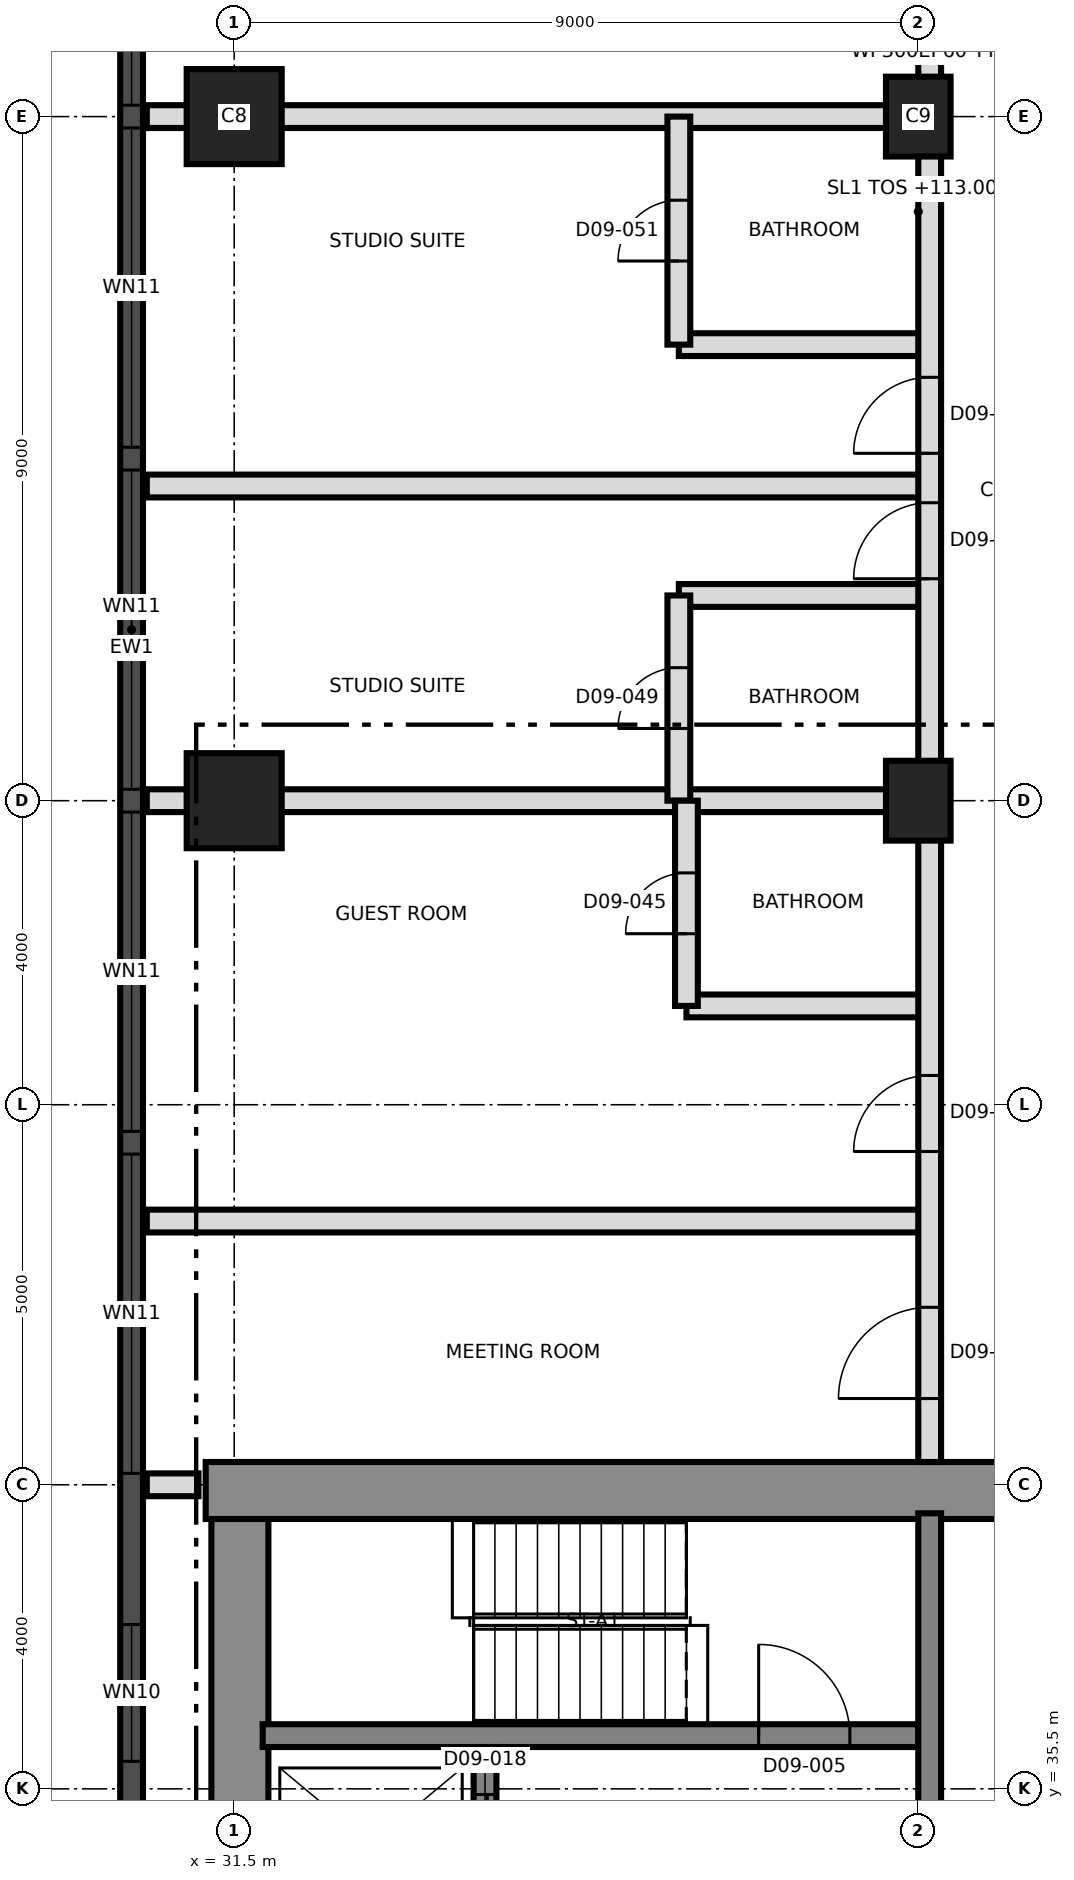
"""IFC4 building model, lengths in metres.
Left out: names, types, materials, properties, quantities, classifications, styles, units other than length and angle.
Written with IfcOpenShell. Run it as: python <this file> out.ifc"""

import sys

from ifc_helpers import new_model, si_unit, direction, frame, frame_2d, origin, origin_2d, place, context, subcontext, project, spatial, rectangle, extrude, element, fill, save


model = new_model("IFC4")
c1 = context("Model", 3, precision=1e-05, world=origin(), true_north=direction((0.0, 1.0)))
c2 = subcontext(c1, "Body", "Model", "MODEL_VIEW")
j1 = project(units=[si_unit("LENGTHUNIT", "METRE"), si_unit("PLANEANGLEUNIT", "RADIAN")], contexts=[c1])
p1 = place(None, origin())
s1 = spatial("IfcSite", under=j1, at=p1, CompositionType="ELEMENT")
p2 = place(p1, origin())
s2 = spatial("IfcBuilding", under=s1, at=p2, CompositionType="ELEMENT")
p3 = place(p2, frame((0.0, 0.0, 113.0)))
s3 = spatial("IfcBuildingStorey", under=s2, at=p3, CompositionType="ELEMENT", Elevation=113.0)
p4 = place(p3, frame((31.575, 21.875, 0.0), z_axis=(0.0, 0.0, 1.0), x_axis=(0.0, 1.0, 0.0)))
e1 = element("IfcWall", 1, at=p4, inside=s3, PredefinedType="SHEAR", context=c2, shape_type="SweptSolid", body=[
    extrude(rectangle(XDim=17.25, YDim=0.75, at=frame_2d((8.625, 0.0))), origin(), (0.0, 0.0, 1.0), 3.7),
])
p5 = place(p3, frame((31.125, 39.425, 0.0), z_axis=(0.0, 0.0, 1.0), x_axis=(1.0, 0.0, 0.0)))
e2 = element("IfcWall", 2, at=p5, inside=s3, PredefinedType="SHEAR", context=c2, shape_type="SweptSolid", body=[
    extrude(rectangle(XDim=27.0, YDim=0.75, at=frame_2d((13.5, 0.0))), origin(), (0.0, 0.0, 1.0), 3.7),
])
p6 = place(p5, frame((10.575, 0.0, 0.0)))
e3 = element("IfcOpeningElement", 3, at=p6, cuts=e2, PredefinedType="OPENING", context=c2, shape_type="SweptSolid", body=[
    extrude(rectangle(XDim=1.2, YDim=2.1, at=frame_2d((0.6, 1.05))), frame((0.0, 0.385, 0.0), z_axis=(0.0, -1.0, 0.0), x_axis=(1.0, 0.0, 0.0)), (0.0, 0.0, 1.0), 0.77),
])
p7 = place(p3, frame((31.875, 36.2, 0.0), z_axis=(0.0, 0.0, 1.0), x_axis=(1.0, 0.0, 0.0)))
e4 = element("IfcWall", 4, at=p7, inside=s3, PredefinedType="SHEAR", context=c2, shape_type="SweptSolid", body=[
    extrude(rectangle(XDim=8.625, YDim=0.3, at=frame_2d((4.312, 0.0))), origin(), (0.0, 0.0, 1.0), 3.7),
])
p8 = place(p7, frame((6.525, 0.0, 0.0)))
e5 = element("IfcOpeningElement", 5, at=p8, cuts=e4, PredefinedType="OPENING", context=c2, shape_type="SweptSolid", body=[
    extrude(rectangle(XDim=1.2, YDim=2.1, at=frame_2d((0.6, 1.05))), frame((0.0, 0.16, 0.0), z_axis=(0.0, -1.0, 0.0), x_axis=(1.0, 0.0, 0.0)), (0.0, 0.0, 1.0), 0.32),
])
p9 = place(p3, frame((40.65, 33.5, 0.0), z_axis=(0.0, 0.0, 1.0), x_axis=(0.0, 1.0, 0.0)))
e6 = element("IfcWall", 6, at=p9, inside=s3, PredefinedType="SHEAR", context=c2, shape_type="SweptSolid", body=[
    extrude(rectangle(XDim=5.625, YDim=0.3, at=frame_2d((2.812, 0.0))), origin(), (0.0, 0.0, 1.0), 3.7),
])
p10 = place(p3, frame((34.8, 33.5, 0.0), z_axis=(0.0, 0.0, 1.0), x_axis=(0.0, 1.0, 0.0)))
e7 = element("IfcWall", 7, at=p10, inside=s3, PredefinedType="SHEAR", context=c2, shape_type="SweptSolid", body=[
    extrude(rectangle(XDim=2.55, YDim=0.3, at=frame_2d((1.275, 0.0))), origin(), (0.0, 0.0, 1.0), 3.7),
])
p11 = place(p10, frame((0.625, 0.0, 0.0)))
e8 = element("IfcOpeningElement", 8, at=p11, cuts=e7, PredefinedType="OPENING", context=c2, shape_type="SweptSolid", body=[
    extrude(rectangle(XDim=1.3, YDim=2.4, at=frame_2d((0.65, 1.2))), frame((0.0, 0.16, 0.0), z_axis=(0.0, -1.0, 0.0), x_axis=(1.0, 0.0, 0.0)), (0.0, 0.0, 1.0), 0.32),
])
p12 = place(p3, frame((31.5, 48.5, 0.0), z_axis=(0.0, 0.0, 1.0), x_axis=(1.0, 0.0, 0.0)))
e9 = element("IfcColumn", 9, at=p12, inside=s3, PredefinedType="COLUMN", context=c2, shape_type="SweptSolid", body=[
    extrude(rectangle(XDim=1.25, YDim=1.25, at=origin_2d()), origin(), (0.0, 0.0, 1.0), 3.7),
])
p13 = place(p3, frame((40.5, 48.5, 0.0), z_axis=(0.0, 0.0, 1.0), x_axis=(0.0, 1.0, 0.0)))
e10 = element("IfcColumn", 10, at=p13, inside=s3, PredefinedType="COLUMN", context=c2, shape_type="SweptSolid", body=[
    extrude(rectangle(XDim=1.05, YDim=0.85, at=origin_2d()), origin(), (0.0, 0.0, 1.0), 3.7),
])
p14 = place(p3, frame((31.5, 57.5, 0.0), z_axis=(0.0, 0.0, 1.0), x_axis=(1.0, 0.0, 0.0)))
e11 = element("IfcColumn", 11, at=p14, inside=s3, PredefinedType="COLUMN", context=c2, shape_type="SweptSolid", body=[
    extrude(rectangle(XDim=1.25, YDim=1.25, at=origin_2d()), origin(), (0.0, 0.0, 1.0), 3.7),
])
p15 = place(p3, frame((40.5, 57.5, 0.0), z_axis=(0.0, 0.0, 1.0), x_axis=(0.0, 1.0, 0.0)))
e12 = element("IfcColumn", 12, at=p15, inside=s3, PredefinedType="COLUMN", context=c2, shape_type="SweptSolid", body=[
    extrude(rectangle(XDim=1.05, YDim=0.85, at=origin_2d()), origin(), (0.0, 0.0, 1.0), 3.7),
])
p16 = place(p3, frame((30.15, 66.992, 0.0), z_axis=(0.0, 0.0, 1.0), x_axis=(0.0, -1.0, 0.0)))
e13 = element("IfcWall", 13, at=p16, inside=s3, PredefinedType="SOLIDWALL", context=c2, shape_type="SweptSolid", body=[
    extrude(rectangle(XDim=32.968, YDim=0.3, at=frame_2d((16.484, 0.0))), origin(), (0.0, 0.0, 1.0), 3.4),
])
p17 = place(p16, frame((1.596, 0.0, 0.3)))
e14 = element("IfcOpeningElement", 14, at=p17, cuts=e13, PredefinedType="OPENING", context=c2, shape_type="SweptSolid", body=[
    extrude(rectangle(XDim=1.8, YDim=2.4, at=frame_2d((0.9, 1.2))), frame((0.0, 0.16, 0.0), z_axis=(0.0, -1.0, 0.0), x_axis=(1.0, 0.0, 0.0)), (0.0, 0.0, 1.0), 0.32),
])
p18 = place(p16, frame((5.142, 0.0, 0.9)))
e15 = element("IfcOpeningElement", 15, at=p18, cuts=e13, PredefinedType="OPENING", context=c2, shape_type="SweptSolid", body=[
    extrude(rectangle(XDim=4.2, YDim=1.5, at=frame_2d((2.1, 0.75))), frame((0.0, 0.16, 0.0), z_axis=(0.0, -1.0, 0.0), x_axis=(1.0, 0.0, 0.0)), (0.0, 0.0, 1.0), 0.32),
])
p19 = place(p16, frame((9.642, 0.0, 0.9)))
e16 = element("IfcOpeningElement", 16, at=p19, cuts=e13, PredefinedType="OPENING", context=c2, shape_type="SweptSolid", body=[
    extrude(rectangle(XDim=4.2, YDim=1.5, at=frame_2d((2.1, 0.75))), frame((0.0, 0.16, 0.0), z_axis=(0.0, -1.0, 0.0), x_axis=(1.0, 0.0, 0.0)), (0.0, 0.0, 1.0), 0.32),
])
p20 = place(p16, frame((14.142, 0.0, 0.9)))
e17 = element("IfcOpeningElement", 17, at=p20, cuts=e13, PredefinedType="OPENING", context=c2, shape_type="SweptSolid", body=[
    extrude(rectangle(XDim=4.2, YDim=1.5, at=frame_2d((2.1, 0.75))), frame((0.0, 0.16, 0.0), z_axis=(0.0, -1.0, 0.0), x_axis=(1.0, 0.0, 0.0)), (0.0, 0.0, 1.0), 0.32),
])
p21 = place(p16, frame((18.642, 0.0, 0.9)))
e18 = element("IfcOpeningElement", 18, at=p21, cuts=e13, PredefinedType="OPENING", context=c2, shape_type="SweptSolid", body=[
    extrude(rectangle(XDim=4.2, YDim=1.5, at=frame_2d((2.1, 0.75))), frame((0.0, 0.16, 0.0), z_axis=(0.0, -1.0, 0.0), x_axis=(1.0, 0.0, 0.0)), (0.0, 0.0, 1.0), 0.32),
])
p22 = place(p16, frame((23.142, 0.0, 0.9)))
e19 = element("IfcOpeningElement", 19, at=p22, cuts=e13, PredefinedType="OPENING", context=c2, shape_type="SweptSolid", body=[
    extrude(rectangle(XDim=4.2, YDim=1.5, at=frame_2d((2.1, 0.75))), frame((0.0, 0.16, 0.0), z_axis=(0.0, -1.0, 0.0), x_axis=(1.0, 0.0, 0.0)), (0.0, 0.0, 1.0), 0.32),
])
p23 = place(p16, frame((29.33, 0.0, 0.3)))
e20 = element("IfcOpeningElement", 20, at=p23, cuts=e13, PredefinedType="OPENING", context=c2, shape_type="SweptSolid", body=[
    extrude(rectangle(XDim=1.8, YDim=2.4, at=frame_2d((0.9, 1.2))), frame((0.0, 0.16, 0.0), z_axis=(0.0, -1.0, 0.0), x_axis=(1.0, 0.0, 0.0)), (0.0, 0.0, 1.0), 0.32),
])
p24 = place(p3, frame((30.35, 39.5, 0.0), z_axis=(0.0, 0.0, 1.0), x_axis=(1.0, 0.0, 0.0)))
e21 = element("IfcWall", 21, at=p24, inside=s3, PredefinedType="PARTITIONING", context=c2, shape_type="SweptSolid", body=[
    extrude(rectangle(XDim=0.68, YDim=0.3, at=frame_2d((0.34, 0.0))), origin(), (0.0, 0.0, 1.0), 3.4),
])
p25 = place(p3, frame((30.35, 42.97, 0.0), z_axis=(0.0, 0.0, 1.0), x_axis=(1.0, 0.0, 0.0)))
e22 = element("IfcWall", 22, at=p25, inside=s3, PredefinedType="PARTITIONING", context=c2, shape_type="SweptSolid", body=[
    extrude(rectangle(XDim=10.3, YDim=0.3, at=frame_2d((5.15, 0.0))), origin(), (0.0, 0.0, 1.0), 3.4),
])
p26 = place(p3, frame((37.45, 45.8, 0.0), z_axis=(0.0, 0.0, 1.0), x_axis=(1.0, 0.0, 0.0)))
e23 = element("IfcWall", 23, at=p26, inside=s3, PredefinedType="PARTITIONING", context=c2, shape_type="SweptSolid", body=[
    extrude(rectangle(XDim=3.2, YDim=0.3, at=frame_2d((1.6, 0.0))), origin(), (0.0, 0.0, 1.0), 3.4),
])
p27 = place(p3, frame((30.35, 48.5, 0.0), z_axis=(0.0, 0.0, 1.0), x_axis=(1.0, 0.0, 0.0)))
e24 = element("IfcWall", 24, at=p27, inside=s3, PredefinedType="PARTITIONING", context=c2, shape_type="SweptSolid", body=[
    extrude(rectangle(XDim=10.3, YDim=0.3, at=frame_2d((5.15, 0.0))), origin(), (0.0, 0.0, 1.0), 3.4),
])
p28 = place(p3, frame((37.35, 51.2, 0.0), z_axis=(0.0, 0.0, 1.0), x_axis=(1.0, 0.0, 0.0)))
e25 = element("IfcWall", 25, at=p28, inside=s3, PredefinedType="PARTITIONING", context=c2, shape_type="SweptSolid", body=[
    extrude(rectangle(XDim=3.3, YDim=0.3, at=frame_2d((1.65, 0.0))), origin(), (0.0, 0.0, 1.0), 3.4),
])
p29 = place(p3, frame((30.35, 52.64, 0.0), z_axis=(0.0, 0.0, 1.0), x_axis=(1.0, 0.0, 0.0)))
e26 = element("IfcWall", 26, at=p29, inside=s3, PredefinedType="PARTITIONING", context=c2, shape_type="SweptSolid", body=[
    extrude(rectangle(XDim=10.3, YDim=0.3, at=frame_2d((5.15, 0.0))), origin(), (0.0, 0.0, 1.0), 3.4),
])
p30 = place(p3, frame((37.35, 54.5, 0.0), z_axis=(0.0, 0.0, 1.0), x_axis=(1.0, 0.0, 0.0)))
e27 = element("IfcWall", 27, at=p30, inside=s3, PredefinedType="PARTITIONING", context=c2, shape_type="SweptSolid", body=[
    extrude(rectangle(XDim=3.3, YDim=0.3, at=frame_2d((1.65, 0.0))), origin(), (0.0, 0.0, 1.0), 3.4),
])
p31 = place(p3, frame((30.35, 57.5, 0.0), z_axis=(0.0, 0.0, 1.0), x_axis=(1.0, 0.0, 0.0)))
e28 = element("IfcWall", 28, at=p31, inside=s3, PredefinedType="PARTITIONING", context=c2, shape_type="SweptSolid", body=[
    extrude(rectangle(XDim=10.3, YDim=0.3, at=frame_2d((5.15, 0.0))), origin(), (0.0, 0.0, 1.0), 3.4),
])
p32 = place(p3, frame((37.35, 48.5, 0.0), z_axis=(0.0, 0.0, 1.0), x_axis=(0.0, 1.0, 0.0)))
e29 = element("IfcWall", 29, at=p32, inside=s3, PredefinedType="PARTITIONING", context=c2, shape_type="SweptSolid", body=[
    extrude(rectangle(XDim=2.7, YDim=0.3, at=frame_2d((1.35, 0.0))), origin(), (0.0, 0.0, 1.0), 3.4),
])
p33 = place(p32, frame((0.95, 0.0, 0.0)))
e30 = element("IfcOpeningElement", 30, at=p33, cuts=e29, PredefinedType="OPENING", context=c2, shape_type="SweptSolid", body=[
    extrude(rectangle(XDim=0.8, YDim=2.1, at=frame_2d((0.4, 1.05))), frame((0.0, 0.16, 0.0), z_axis=(0.0, -1.0, 0.0), x_axis=(1.0, 0.0, 0.0)), (0.0, 0.0, 1.0), 0.32),
])
p34 = place(p3, frame((37.35, 54.5, 0.0), z_axis=(0.0, 0.0, 1.0), x_axis=(0.0, 1.0, 0.0)))
e31 = element("IfcWall", 31, at=p34, inside=s3, PredefinedType="PARTITIONING", context=c2, shape_type="SweptSolid", body=[
    extrude(rectangle(XDim=3.0, YDim=0.3, at=frame_2d((1.5, 0.0))), origin(), (0.0, 0.0, 1.0), 3.4),
])
p35 = place(p34, frame((1.1, 0.0, 0.0)))
e32 = element("IfcOpeningElement", 32, at=p35, cuts=e31, PredefinedType="OPENING", context=c2, shape_type="SweptSolid", body=[
    extrude(rectangle(XDim=0.8, YDim=2.1, at=frame_2d((0.4, 1.05))), frame((0.0, 0.16, 0.0), z_axis=(0.0, -1.0, 0.0), x_axis=(1.0, 0.0, 0.0)), (0.0, 0.0, 1.0), 0.32),
])
p36 = place(p3, frame((37.45, 45.8, 0.0), z_axis=(0.0, 0.0, 1.0), x_axis=(0.0, 1.0, 0.0)))
e33 = element("IfcWall", 33, at=p36, inside=s3, PredefinedType="PARTITIONING", context=c2, shape_type="SweptSolid", body=[
    extrude(rectangle(XDim=2.7, YDim=0.3, at=frame_2d((1.35, 0.0))), origin(), (0.0, 0.0, 1.0), 3.4),
])
p37 = place(p36, frame((0.95, 0.0, 0.0)))
e34 = element("IfcOpeningElement", 34, at=p37, cuts=e33, PredefinedType="OPENING", context=c2, shape_type="SweptSolid", body=[
    extrude(rectangle(XDim=0.8, YDim=2.1, at=frame_2d((0.4, 1.05))), frame((0.0, 0.16, 0.0), z_axis=(0.0, -1.0, 0.0), x_axis=(1.0, 0.0, 0.0)), (0.0, 0.0, 1.0), 0.32),
])
p38 = place(p3, frame((40.65, 39.8, 0.0), z_axis=(0.0, 0.0, 1.0), x_axis=(0.0, 1.0, 0.0)))
e35 = element("IfcWall", 35, at=p38, inside=s3, PredefinedType="PARTITIONING", context=c2, shape_type="SweptSolid", body=[
    extrude(rectangle(XDim=37.09, YDim=0.3, at=frame_2d((18.545, 0.0))), origin(), (0.0, 0.0, 1.0), 3.4),
])
p39 = place(p38, frame((0.835, 0.0, 0.0)))
e36 = element("IfcOpeningElement", 36, at=p39, cuts=e35, PredefinedType="OPENING", context=c2, shape_type="SweptSolid", body=[
    extrude(rectangle(XDim=1.2, YDim=2.1, at=frame_2d((0.6, 1.05))), frame((0.0, 0.16, 0.0), z_axis=(0.0, -1.0, 0.0), x_axis=(1.0, 0.0, 0.0)), (0.0, 0.0, 1.0), 0.32),
])
p40 = place(p38, frame((4.085, 0.0, 0.0)))
e37 = element("IfcOpeningElement", 37, at=p40, cuts=e35, PredefinedType="OPENING", context=c2, shape_type="SweptSolid", body=[
    extrude(rectangle(XDim=1.0, YDim=2.1, at=frame_2d((0.5, 1.05))), frame((0.0, 0.16, 0.0), z_axis=(0.0, -1.0, 0.0), x_axis=(1.0, 0.0, 0.0)), (0.0, 0.0, 1.0), 0.32),
])
p41 = place(p38, frame((11.62, 0.0, 0.0)))
e38 = element("IfcOpeningElement", 38, at=p41, cuts=e35, PredefinedType="OPENING", context=c2, shape_type="SweptSolid", body=[
    extrude(rectangle(XDim=1.0, YDim=2.4, at=frame_2d((0.5, 1.2))), frame((0.0, 0.16, 0.0), z_axis=(0.0, -1.0, 0.0), x_axis=(1.0, 0.0, 0.0)), (0.0, 0.0, 1.0), 0.32),
])
p42 = place(p38, frame((13.27, 0.0, 0.0)))
e39 = element("IfcOpeningElement", 39, at=p42, cuts=e35, PredefinedType="OPENING", context=c2, shape_type="SweptSolid", body=[
    extrude(rectangle(XDim=1.0, YDim=2.4, at=frame_2d((0.5, 1.2))), frame((0.0, 0.16, 0.0), z_axis=(0.0, -1.0, 0.0), x_axis=(1.0, 0.0, 0.0)), (0.0, 0.0, 1.0), 0.32),
])
p43 = place(p38, frame((21.2, 0.0, 0.0)))
e40 = element("IfcOpeningElement", 40, at=p43, cuts=e35, PredefinedType="OPENING", context=c2, shape_type="SweptSolid", body=[
    extrude(rectangle(XDim=1.0, YDim=2.4, at=frame_2d((0.5, 1.2))), frame((0.0, 0.16, 0.0), z_axis=(0.0, -1.0, 0.0), x_axis=(1.0, 0.0, 0.0)), (0.0, 0.0, 1.0), 0.32),
])
p44 = place(p18, origin())
e41 = element("IfcWindow", 41, at=p44, inside=s3, PartitioningType="SINGLE_PANEL", PredefinedType="WINDOW", context=c2, shape_type="SweptSolid", body=[
    extrude(rectangle(XDim=4.2, YDim=1.5, at=frame_2d((2.1, 0.75))), frame((0.0, 0.03, 0.0), z_axis=(0.0, -1.0, 0.0), x_axis=(1.0, 0.0, 0.0)), (0.0, 0.0, 1.0), 0.06),
])
fill(e15, e41)
p45 = place(p19, origin())
e42 = element("IfcWindow", 42, at=p45, inside=s3, PartitioningType="SINGLE_PANEL", PredefinedType="WINDOW", context=c2, shape_type="SweptSolid", body=[
    extrude(rectangle(XDim=4.2, YDim=1.5, at=frame_2d((2.1, 0.75))), frame((0.0, 0.03, 0.0), z_axis=(0.0, -1.0, 0.0), x_axis=(1.0, 0.0, 0.0)), (0.0, 0.0, 1.0), 0.06),
])
fill(e16, e42)
p46 = place(p20, origin())
e43 = element("IfcWindow", 43, at=p46, inside=s3, PartitioningType="SINGLE_PANEL", PredefinedType="WINDOW", context=c2, shape_type="SweptSolid", body=[
    extrude(rectangle(XDim=4.2, YDim=1.5, at=frame_2d((2.1, 0.75))), frame((0.0, 0.03, 0.0), z_axis=(0.0, -1.0, 0.0), x_axis=(1.0, 0.0, 0.0)), (0.0, 0.0, 1.0), 0.06),
])
fill(e17, e43)
p47 = place(p21, origin())
e44 = element("IfcWindow", 44, at=p47, inside=s3, PartitioningType="SINGLE_PANEL", PredefinedType="WINDOW", context=c2, shape_type="SweptSolid", body=[
    extrude(rectangle(XDim=4.2, YDim=1.5, at=frame_2d((2.1, 0.75))), frame((0.0, 0.03, 0.0), z_axis=(0.0, -1.0, 0.0), x_axis=(1.0, 0.0, 0.0)), (0.0, 0.0, 1.0), 0.06),
])
fill(e18, e44)
p48 = place(p22, origin())
e45 = element("IfcWindow", 45, at=p48, inside=s3, PartitioningType="SINGLE_PANEL", PredefinedType="WINDOW", context=c2, shape_type="SweptSolid", body=[
    extrude(rectangle(XDim=4.2, YDim=1.5, at=frame_2d((2.1, 0.75))), frame((0.0, 0.03, 0.0), z_axis=(0.0, -1.0, 0.0), x_axis=(1.0, 0.0, 0.0)), (0.0, 0.0, 1.0), 0.06),
])
fill(e19, e45)
p49 = place(p23, origin())
e46 = element("IfcWindow", 46, at=p49, inside=s3, PartitioningType="SINGLE_PANEL", PredefinedType="WINDOW", context=c2, shape_type="SweptSolid", body=[
    extrude(rectangle(XDim=1.8, YDim=2.4, at=frame_2d((0.9, 1.2))), frame((0.0, 0.03, 0.0), z_axis=(0.0, -1.0, 0.0), x_axis=(1.0, 0.0, 0.0)), (0.0, 0.0, 1.0), 0.06),
])
fill(e20, e46)
p50 = place(p8, origin())
e47 = element("IfcDoor", 47, at=p50, inside=s3, OperationType="SINGLE_SWING_RIGHT", PredefinedType="DOOR", context=c2, shape_type="SweptSolid", body=[
    extrude(rectangle(XDim=1.2, YDim=2.1, at=frame_2d((0.6, 1.05))), frame((0.0, 0.025, 0.0), z_axis=(0.0, -1.0, 0.0), x_axis=(1.0, 0.0, 0.0)), (0.0, 0.0, 1.0), 0.05),
])
fill(e5, e47)
p51 = place(p11, origin())
e48 = element("IfcDoor", 48, at=p51, inside=s3, OperationType="SLIDING_TO_LEFT", PredefinedType="DOOR", context=c2, shape_type="SweptSolid", body=[
    extrude(rectangle(XDim=1.3, YDim=2.4, at=frame_2d((0.65, 1.2))), frame((0.0, 0.025, 0.0), z_axis=(0.0, -1.0, 0.0), x_axis=(1.0, 0.0, 0.0)), (0.0, 0.0, 1.0), 0.05),
])
fill(e8, e48)
p52 = place(p39, origin())
e49 = element("IfcDoor", 49, at=p52, inside=s3, OperationType="SINGLE_SWING_RIGHT", PredefinedType="DOOR", context=c2, shape_type="SweptSolid", body=[
    extrude(rectangle(XDim=1.2, YDim=2.1, at=frame_2d((0.6, 1.05))), frame((0.0, 0.025, 0.0), z_axis=(0.0, -1.0, 0.0), x_axis=(1.0, 0.0, 0.0)), (0.0, 0.0, 1.0), 0.05),
])
fill(e36, e49)
p53 = place(p37, origin())
e50 = element("IfcDoor", 50, at=p53, inside=s3, OperationType="SINGLE_SWING_LEFT", PredefinedType="DOOR", context=c2, shape_type="SweptSolid", body=[
    extrude(rectangle(XDim=0.8, YDim=2.1, at=frame_2d((0.4, 1.05))), frame((0.0, 0.025, 0.0), z_axis=(0.0, -1.0, 0.0), x_axis=(1.0, 0.0, 0.0)), (0.0, 0.0, 1.0), 0.05),
])
fill(e34, e50)
p54 = place(p40, origin())
e51 = element("IfcDoor", 51, at=p54, inside=s3, OperationType="SINGLE_SWING_LEFT", PredefinedType="DOOR", context=c2, shape_type="SweptSolid", body=[
    extrude(rectangle(XDim=1.0, YDim=2.1, at=frame_2d((0.5, 1.05))), frame((0.0, 0.025, 0.0), z_axis=(0.0, -1.0, 0.0), x_axis=(1.0, 0.0, 0.0)), (0.0, 0.0, 1.0), 0.05),
])
fill(e37, e51)
p55 = place(p33, origin())
e52 = element("IfcDoor", 52, at=p55, inside=s3, OperationType="SINGLE_SWING_RIGHT", PredefinedType="DOOR", context=c2, shape_type="SweptSolid", body=[
    extrude(rectangle(XDim=0.8, YDim=2.1, at=frame_2d((0.4, 1.05))), frame((0.0, 0.025, 0.0), z_axis=(0.0, -1.0, 0.0), x_axis=(1.0, 0.0, 0.0)), (0.0, 0.0, 1.0), 0.05),
])
fill(e30, e52)
p56 = place(p41, origin())
e53 = element("IfcDoor", 53, at=p56, inside=s3, OperationType="SINGLE_SWING_LEFT", PredefinedType="DOOR", context=c2, shape_type="SweptSolid", body=[
    extrude(rectangle(XDim=1.0, YDim=2.4, at=frame_2d((0.5, 1.2))), frame((0.0, 0.025, 0.0), z_axis=(0.0, -1.0, 0.0), x_axis=(1.0, 0.0, 0.0)), (0.0, 0.0, 1.0), 0.05),
])
fill(e38, e53)
p57 = place(p35, origin())
e54 = element("IfcDoor", 54, at=p57, inside=s3, OperationType="SINGLE_SWING_LEFT", PredefinedType="DOOR", context=c2, shape_type="SweptSolid", body=[
    extrude(rectangle(XDim=0.8, YDim=2.1, at=frame_2d((0.4, 1.05))), frame((0.0, 0.025, 0.0), z_axis=(0.0, -1.0, 0.0), x_axis=(1.0, 0.0, 0.0)), (0.0, 0.0, 1.0), 0.05),
])
fill(e32, e54)
p58 = place(p42, origin())
e55 = element("IfcDoor", 55, at=p58, inside=s3, OperationType="SINGLE_SWING_LEFT", PredefinedType="DOOR", context=c2, shape_type="SweptSolid", body=[
    extrude(rectangle(XDim=1.0, YDim=2.4, at=frame_2d((0.5, 1.2))), frame((0.0, 0.025, 0.0), z_axis=(0.0, -1.0, 0.0), x_axis=(1.0, 0.0, 0.0)), (0.0, 0.0, 1.0), 0.05),
])
fill(e39, e55)
save(model, sys.argv[1])
